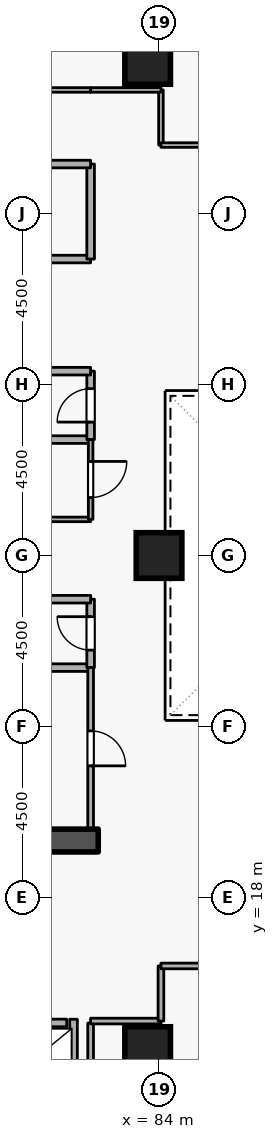
"""IFC4 building model, lengths in metres.
Left out: names, types, materials, properties, quantities, classifications, styles, units other than length and angle.
Written with IfcOpenShell. Run it as: python <this file> out.ifc"""

import sys

from ifc_helpers import new_model, si_unit, direction, frame, frame_2d, origin, origin_2d, place, context, subcontext, project, spatial, rectangle, extrude, element, fill, save


model = new_model("IFC4")
c1 = context("Model", 3, precision=1e-05, world=origin(), true_north=direction((0.0, 1.0)))
c2 = subcontext(c1, "Body", "Model", "MODEL_VIEW")
j1 = project(units=[si_unit("LENGTHUNIT", "METRE"), si_unit("PLANEANGLEUNIT", "RADIAN")], contexts=[c1])
p1 = place(None, origin())
s1 = spatial("IfcSite", under=j1, at=p1, CompositionType="ELEMENT")
p2 = place(p1, origin())
s2 = spatial("IfcBuilding", under=s1, at=p2, CompositionType="ELEMENT")
p3 = place(p2, frame((0.0, 0.0, 105.3)))
s3 = spatial("IfcBuildingStorey", under=s2, at=p3, CompositionType="ELEMENT", Elevation=105.3)
p4 = place(p3, frame((76.7, 19.5, 0.0), z_axis=(0.0, 0.0, 1.0), x_axis=(1.0, 0.0, 0.0)))
e1 = element("IfcWall", 1, at=p4, inside=s3, PredefinedType="SHEAR", context=c2, shape_type="SweptSolid", body=[
    extrude(rectangle(XDim=5.7, YDim=0.6, at=frame_2d((2.85, 0.0))), origin(), (0.0, 0.0, 1.0), 3.6),
])
for number, where, z_axis, x_axis in (
    (2, (83.7, 14.0, 0.0), (0.0, 0.0, 1.0), (1.0, 0.0, 0.0)),
    (3, (83.7, 40.0, 0.0), (0.0, 0.0, 1.0), (1.0, 0.0, 0.0)),
    (4, (84.0, 27.0, 0.0), (0.0, 0.0, 1.0), (1.0, 0.0, 0.0)),
):
    element("IfcColumn", number, at=place(p3, frame(where, z_axis=z_axis, x_axis=x_axis)), inside=s3, PredefinedType="COLUMN", context=c2, shape_type="SweptSolid", body=[
        extrude(rectangle(XDim=1.2, YDim=1.2, at=origin_2d()), origin(), (0.0, 0.0, 1.0), 3.6),
    ])
p5 = place(p3, frame((79.63, 14.7, 0.0), z_axis=(0.0, 0.0, 1.0), x_axis=(1.0, 0.0, 0.0)))
e5 = element("IfcWall", 5, at=p5, inside=s3, PredefinedType="STANDARD", context=c2, shape_type="SweptSolid", body=[
    extrude(rectangle(XDim=1.94, YDim=0.2, at=frame_2d((0.97, 0.0))), origin(), (0.0, 0.0, 1.0), 3.34),
])
p6 = place(p5, frame((0.46, 0.0, 0.0)))
e6 = element("IfcOpeningElement", 6, at=p6, cuts=e5, PredefinedType="OPENING", context=c2, shape_type="SweptSolid", body=[
    extrude(rectangle(XDim=1.02, YDim=2.06, at=frame_2d((0.51, 1.03))), frame((0.0, 0.11, 0.0), z_axis=(0.0, -1.0, 0.0), x_axis=(1.0, 0.0, 0.0)), (0.0, 0.0, 1.0), 0.22),
])
p7 = place(p3, frame((81.75, 12.612, 0.0), z_axis=(0.0, 0.0, 1.0), x_axis=(0.0, 1.0, 0.0)))
e7 = element("IfcWall", 7, at=p7, inside=s3, PredefinedType="STANDARD", context=c2, shape_type="SweptSolid", body=[
    extrude(rectangle(XDim=2.186, YDim=0.2, at=frame_2d((1.093, 0.0))), origin(), (0.0, 0.0, 1.0), 3.34),
])
p8 = place(p3, frame((79.9, 34.8, 0.0), z_axis=(0.0, 0.0, 1.0), x_axis=(1.0, 0.0, 0.0)))
e8 = element("IfcWall", 8, at=p8, inside=s3, PredefinedType="STANDARD", context=c2, shape_type="SweptSolid", body=[
    extrude(rectangle(XDim=2.3, YDim=0.2, at=frame_2d((1.15, 0.0))), origin(), (0.0, 0.0, 1.0), 2.545),
])
p9 = place(p3, frame((82.2, 34.8, 0.0), z_axis=(0.0, 0.0, 1.0), x_axis=(0.0, 1.0, 0.0)))
e9 = element("IfcWall", 9, at=p9, inside=s3, PredefinedType="STANDARD", context=c2, shape_type="SweptSolid", body=[
    extrude(rectangle(XDim=2.5, YDim=0.2, at=frame_2d((1.25, 0.0))), origin(), (0.0, 0.0, 1.0), 3.34),
])
p10 = place(p3, frame((82.2, 37.3, 0.0), z_axis=(0.0, 0.0, 1.0), x_axis=(-1.0, 0.0, 0.0)))
e10 = element("IfcWall", 10, at=p10, inside=s3, PredefinedType="STANDARD", context=c2, shape_type="SweptSolid", body=[
    extrude(rectangle(XDim=5.7, YDim=0.2, at=frame_2d((2.85, 0.0))), origin(), (0.0, 0.0, 1.0), 3.34),
])
p11 = place(p10, frame((2.275, 0.0, 0.0)))
e11 = element("IfcOpeningElement", 11, at=p11, cuts=e10, PredefinedType="OPENING", context=c2, shape_type="SweptSolid", body=[
    extrude(rectangle(XDim=1.15, YDim=2.1, at=frame_2d((0.575, 1.05))), frame((0.0, 0.11, 0.0), z_axis=(0.0, -1.0, 0.0), x_axis=(1.0, 0.0, 0.0)), (0.0, 0.0, 1.0), 0.22),
])
p12 = place(p3, frame((80.15, 24.05, 0.0), z_axis=(0.0, 0.0, 1.0), x_axis=(1.0, 0.0, 0.0)))
e12 = element("IfcWall", 12, at=p12, inside=s3, PredefinedType="STANDARD", context=c2, shape_type="SweptSolid", body=[
    extrude(rectangle(XDim=2.05, YDim=0.2, at=frame_2d((1.025, 0.0))), origin(), (0.0, 0.0, 1.0), 3.34),
])
p13 = place(p3, frame((82.2, 24.05, 0.0), z_axis=(0.0, 0.0, 1.0), x_axis=(0.0, 1.0, 0.0)))
e13 = element("IfcWall", 13, at=p13, inside=s3, PredefinedType="STANDARD", context=c2, shape_type="SweptSolid", body=[
    extrude(rectangle(XDim=1.8, YDim=0.2, at=frame_2d((0.9, 0.0))), origin(), (0.0, 0.0, 1.0), 3.34),
])
p14 = place(p13, frame((0.46, 0.0, 0.0)))
e14 = element("IfcOpeningElement", 14, at=p14, cuts=e13, PredefinedType="OPENING", context=c2, shape_type="SweptSolid", body=[
    extrude(rectangle(XDim=0.88, YDim=2.04, at=frame_2d((0.44, 1.02))), frame((0.0, 0.11, 0.0), z_axis=(0.0, -1.0, 0.0), x_axis=(1.0, 0.0, 0.0)), (0.0, 0.0, 1.0), 0.22),
])
for number, where, z_axis, x_axis in (
    (15, (82.2, 25.85, 0.0), (0.0, 0.0, 1.0), (-1.0, 0.0, 0.0)),
    (16, (80.15, 30.05, 0.0), (0.0, 0.0, 1.0), (1.0, 0.0, 0.0)),
):
    element("IfcWall", number, at=place(p3, frame(where, z_axis=z_axis, x_axis=x_axis)), inside=s3, PredefinedType="STANDARD", context=c2, shape_type="SweptSolid", body=[
        extrude(rectangle(XDim=2.05, YDim=0.2, at=frame_2d((1.025, 0.0))), origin(), (0.0, 0.0, 1.0), 3.34),
    ])
p15 = place(p3, frame((82.2, 30.05, 0.0), z_axis=(0.0, 0.0, 1.0), x_axis=(0.0, 1.0, 0.0)))
e17 = element("IfcWall", 17, at=p15, inside=s3, PredefinedType="STANDARD", context=c2, shape_type="SweptSolid", body=[
    extrude(rectangle(XDim=1.8, YDim=0.2, at=frame_2d((0.9, 0.0))), origin(), (0.0, 0.0, 1.0), 3.34),
])
p16 = place(p15, frame((0.46, 0.0, 0.0)))
e18 = element("IfcOpeningElement", 18, at=p16, cuts=e17, PredefinedType="OPENING", context=c2, shape_type="SweptSolid", body=[
    extrude(rectangle(XDim=0.88, YDim=2.04, at=frame_2d((0.44, 1.02))), frame((0.0, 0.11, 0.0), z_axis=(0.0, -1.0, 0.0), x_axis=(1.0, 0.0, 0.0)), (0.0, 0.0, 1.0), 0.22),
])
p17 = place(p3, frame((82.2, 31.85, 0.0), z_axis=(0.0, 0.0, 1.0), x_axis=(-1.0, 0.0, 0.0)))
e19 = element("IfcWall", 19, at=p17, inside=s3, PredefinedType="STANDARD", context=c2, shape_type="SweptSolid", body=[
    extrude(rectangle(XDim=2.05, YDim=0.2, at=frame_2d((1.025, 0.0))), origin(), (0.0, 0.0, 1.0), 3.34),
])
p18 = place(p3, frame((82.2, 24.05, 0.0), z_axis=(0.0, 0.0, 1.0), x_axis=(0.0, -1.0, 0.0)))
e20 = element("IfcWall", 20, at=p18, inside=s3, PredefinedType="PARTITIONING", context=c2, shape_type="SweptSolid", body=[
    extrude(rectangle(XDim=4.25, YDim=0.15, at=frame_2d((2.125, 0.0))), origin(), (0.0, 0.0, 1.0), 3.34),
])
p19 = place(p18, frame((1.665, 0.0, 0.0)))
e21 = element("IfcOpeningElement", 21, at=p19, cuts=e20, PredefinedType="OPENING", context=c2, shape_type="SweptSolid", body=[
    extrude(rectangle(XDim=0.92, YDim=2.08, at=frame_2d((0.46, 1.04))), frame((0.0, 0.085, 0.0), z_axis=(0.0, -1.0, 0.0), x_axis=(1.0, 0.0, 0.0)), (0.0, 0.0, 1.0), 0.17),
])
p20 = place(p3, frame((82.2, 27.95, 0.0), z_axis=(0.0, 0.0, 1.0), x_axis=(-1.0, 0.0, 0.0)))
e22 = element("IfcWall", 22, at=p20, inside=s3, PredefinedType="PARTITIONING", context=c2, shape_type="SweptSolid", body=[
    extrude(rectangle(XDim=2.05, YDim=0.12, at=frame_2d((1.025, 0.0))), origin(), (0.0, 0.0, 1.0), 3.34),
])
p21 = place(p3, frame((82.2, 30.05, 0.0), z_axis=(0.0, 0.0, 1.0), x_axis=(0.0, -1.0, 0.0)))
e23 = element("IfcWall", 23, at=p21, inside=s3, PredefinedType="PARTITIONING", context=c2, shape_type="SweptSolid", body=[
    extrude(rectangle(XDim=2.1, YDim=0.12, at=frame_2d((1.05, 0.0))), origin(), (0.0, 0.0, 1.0), 3.34),
])
p22 = place(p21, frame((0.575, 0.0, 0.0)))
e24 = element("IfcOpeningElement", 24, at=p22, cuts=e23, PredefinedType="OPENING", context=c2, shape_type="SweptSolid", body=[
    extrude(rectangle(XDim=0.95, YDim=2.1, at=frame_2d((0.475, 1.05))), frame((0.0, 0.07, 0.0), z_axis=(0.0, -1.0, 0.0), x_axis=(1.0, 0.0, 0.0)), (0.0, 0.0, 1.0), 0.14),
])
p23 = place(p3, frame((82.2, 12.4, 0.0), z_axis=(0.0, 0.0, 1.0), x_axis=(0.0, 1.0, 0.0)))
e25 = element("IfcWall", 25, at=p23, inside=s3, PredefinedType="PARTITIONING", context=c2, shape_type="SweptSolid", body=[
    extrude(rectangle(XDim=2.3, YDim=0.15, at=frame_2d((1.15, 0.0))), origin(), (0.0, 0.0, 1.0), 3.34),
])
p24 = place(p3, frame((82.2, 14.75, 0.0), z_axis=(0.0, 0.0, 1.0), x_axis=(1.0, 0.0, 0.0)))
e26 = element("IfcWall", 26, at=p24, inside=s3, PredefinedType="PARTITIONING", context=c2, shape_type="SweptSolid", body=[
    extrude(rectangle(XDim=1.85, YDim=0.15, at=frame_2d((0.925, 0.0))), origin(), (0.0, 0.0, 1.0), 3.34),
])
p25 = place(p3, frame((84.05, 14.75, 0.0), z_axis=(0.0, 0.0, 1.0), x_axis=(0.0, 1.0, 0.0)))
e27 = element("IfcWall", 27, at=p25, inside=s3, PredefinedType="PARTITIONING", context=c2, shape_type="SweptSolid", body=[
    extrude(rectangle(XDim=1.45, YDim=0.15, at=frame_2d((0.725, 0.0))), origin(), (0.0, 0.0, 1.0), 3.34),
])
p26 = place(p3, frame((84.05, 16.2, 0.0), z_axis=(0.0, 0.0, 1.0), x_axis=(1.0, 0.0, 0.0)))
e28 = element("IfcWall", 28, at=p26, inside=s3, PredefinedType="PARTITIONING", context=c2, shape_type="SweptSolid", body=[
    extrude(rectangle(XDim=4.45, YDim=0.15, at=frame_2d((2.225, 0.0))), origin(), (0.0, 0.0, 1.0), 3.34),
])
p27 = place(p26, frame((1.575, 0.0, 0.0)))
e29 = element("IfcOpeningElement", 29, at=p27, cuts=e28, PredefinedType="OPENING", context=c2, shape_type="SweptSolid", body=[
    extrude(rectangle(XDim=1.3, YDim=2.12, at=frame_2d((0.65, 1.06))), frame((0.0, 0.085, 0.0), z_axis=(0.0, -1.0, 0.0), x_axis=(1.0, 0.0, 0.0)), (0.0, 0.0, 1.0), 0.17),
])
p28 = place(p3, frame((84.05, 37.8, 0.0), z_axis=(0.0, 0.0, 1.0), x_axis=(0.0, 1.0, 0.0)))
e30 = element("IfcWall", 30, at=p28, inside=s3, PredefinedType="PARTITIONING", context=c2, shape_type="SweptSolid", body=[
    extrude(rectangle(XDim=1.45, YDim=0.12, at=frame_2d((0.725, 0.0))), origin(), (0.0, 0.0, 1.0), 3.34),
])
p29 = place(p3, frame((84.05, 39.25, 0.0), z_axis=(0.0, 0.0, 1.0), x_axis=(-1.0, 0.0, 0.0)))
e31 = element("IfcWall", 31, at=p29, inside=s3, PredefinedType="PARTITIONING", context=c2, shape_type="SweptSolid", body=[
    extrude(rectangle(XDim=1.85, YDim=0.12, at=frame_2d((0.925, 0.0))), origin(), (0.0, 0.0, 1.0), 3.34),
])
p30 = place(p3, frame((82.2, 39.25, 0.0), z_axis=(0.0, 0.0, 1.0), x_axis=(-1.0, 0.0, 0.0)))
e32 = element("IfcWall", 32, at=p30, inside=s3, PredefinedType="PARTITIONING", context=c2, shape_type="SweptSolid", body=[
    extrude(rectangle(XDim=9.35, YDim=0.12, at=frame_2d((4.675, 0.0))), origin(), (0.0, 0.0, 1.0), 3.34),
])
p31 = place(p30, frame((4.15, 0.0, 0.0)))
e33 = element("IfcOpeningElement", 33, at=p31, cuts=e32, PredefinedType="OPENING", context=c2, shape_type="SweptSolid", body=[
    extrude(rectangle(XDim=1.05, YDim=2.1, at=frame_2d((0.525, 1.05))), frame((0.0, 0.07, 0.0), z_axis=(0.0, -1.0, 0.0), x_axis=(1.0, 0.0, 0.0)), (0.0, 0.0, 1.0), 0.14),
])
p32 = place(p3, frame((88.5, 37.8, 0.0), z_axis=(0.0, 0.0, 1.0), x_axis=(-1.0, 0.0, 0.0)))
e34 = element("IfcWall", 34, at=p32, inside=s3, PredefinedType="PARTITIONING", context=c2, shape_type="SweptSolid", body=[
    extrude(rectangle(XDim=4.45, YDim=0.12, at=frame_2d((2.225, 0.0))), origin(), (0.0, 0.0, 1.0), 3.34),
])
p33 = place(p14, origin())
e35 = element("IfcDoor", 35, at=p33, inside=s3, OperationType="SINGLE_SWING_RIGHT", PredefinedType="DOOR", context=c2, shape_type="SweptSolid", body=[
    extrude(rectangle(XDim=0.88, YDim=2.04, at=frame_2d((0.44, 1.02))), frame((0.0, 0.025, 0.0), z_axis=(0.0, -1.0, 0.0), x_axis=(1.0, 0.0, 0.0)), (0.0, 0.0, 1.0), 0.05),
])
fill(e14, e35)
p34 = place(p16, origin())
e36 = element("IfcDoor", 36, at=p34, inside=s3, OperationType="SINGLE_SWING_LEFT", PredefinedType="DOOR", context=c2, shape_type="SweptSolid", body=[
    extrude(rectangle(XDim=0.88, YDim=2.04, at=frame_2d((0.44, 1.02))), frame((0.0, 0.025, 0.0), z_axis=(0.0, -1.0, 0.0), x_axis=(1.0, 0.0, 0.0)), (0.0, 0.0, 1.0), 0.05),
])
fill(e18, e36)
p35 = place(p19, origin())
e37 = element("IfcDoor", 37, at=p35, inside=s3, OperationType="SINGLE_SWING_RIGHT", PredefinedType="DOOR", context=c2, shape_type="SweptSolid", body=[
    extrude(rectangle(XDim=0.92, YDim=2.08, at=frame_2d((0.46, 1.04))), frame((0.0, 0.025, 0.0), z_axis=(0.0, -1.0, 0.0), x_axis=(1.0, 0.0, 0.0)), (0.0, 0.0, 1.0), 0.05),
])
fill(e21, e37)
p36 = place(p22, origin())
e38 = element("IfcDoor", 38, at=p36, inside=s3, OperationType="SINGLE_SWING_LEFT", PredefinedType="DOOR", context=c2, shape_type="SweptSolid", body=[
    extrude(rectangle(XDim=0.95, YDim=2.1, at=frame_2d((0.475, 1.05))), frame((0.0, 0.025, 0.0), z_axis=(0.0, -1.0, 0.0), x_axis=(1.0, 0.0, 0.0)), (0.0, 0.0, 1.0), 0.05),
])
fill(e24, e38)
save(model, sys.argv[1])
